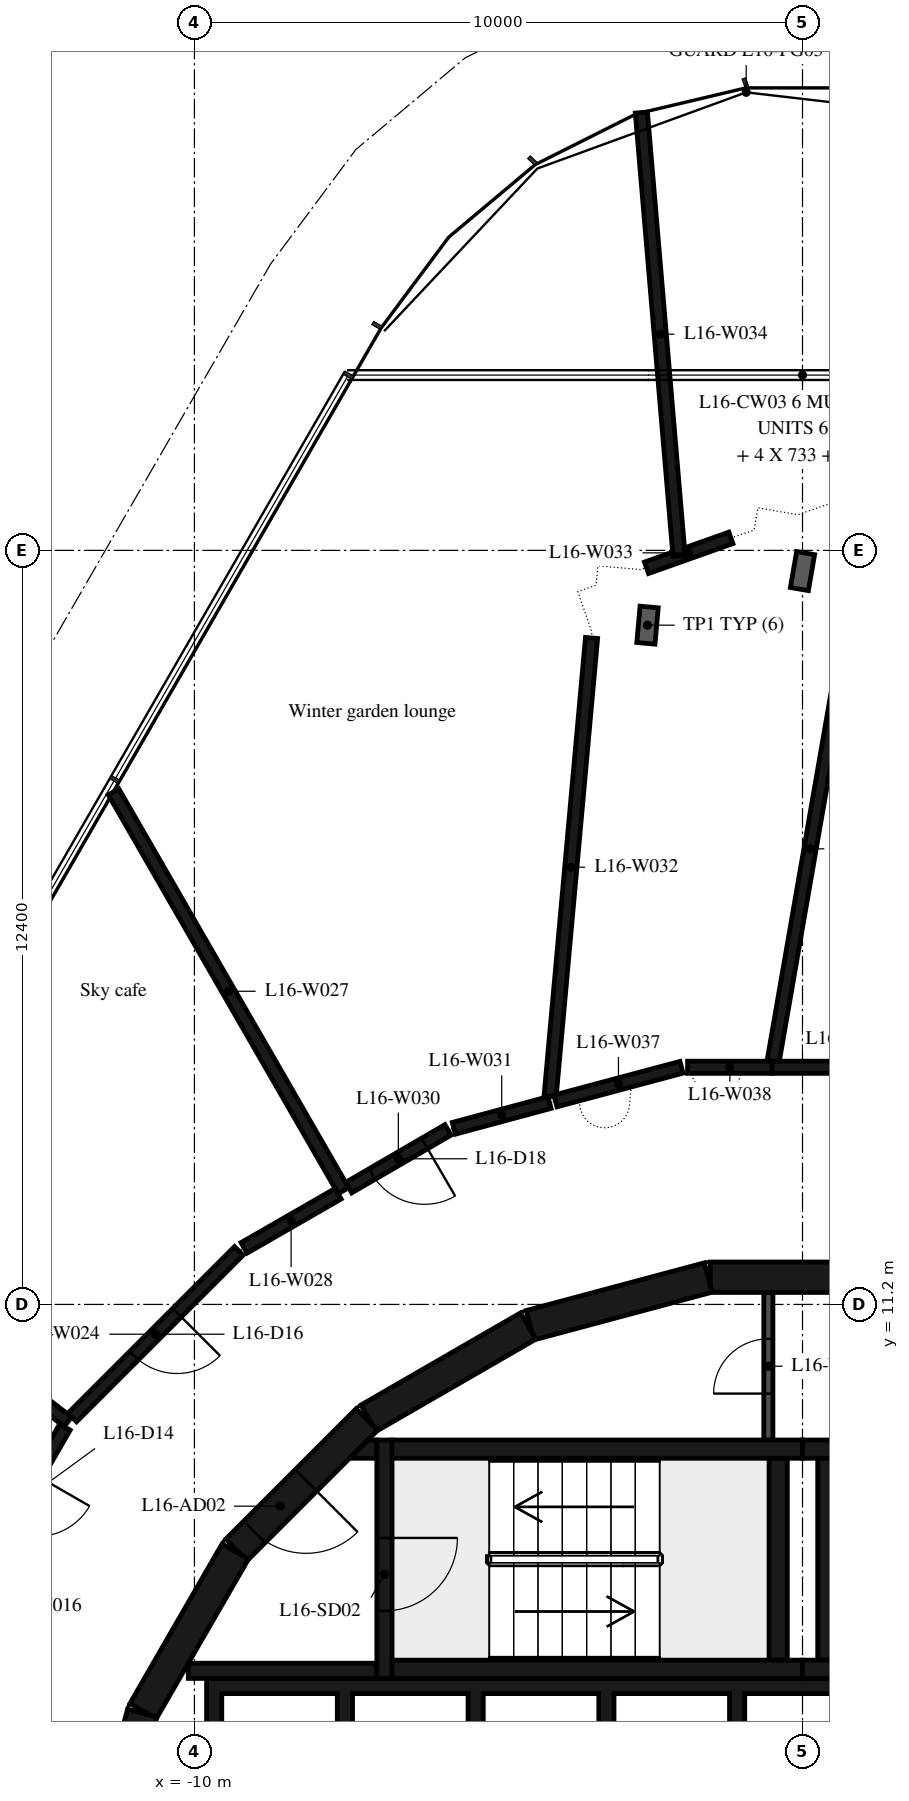
"""IFC4 building model, lengths in metres.
Left out: names, types, materials, properties, quantities, classifications, styles, units other than length and angle.
Written with IfcOpenShell. Run it as: python <this file> out.ifc"""

import sys

from ifc_helpers import new_model, si_unit, direction, frame, frame_2d, origin, place, context, subcontext, project, spatial, polyline, rectangle, outline, extrude, element, fill, save


model = new_model("IFC4")
c1 = context("Model", 3, precision=1e-05, world=origin(), true_north=direction((0.0, 1.0)))
c2 = subcontext(c1, "Body", "Model", "MODEL_VIEW")
j1 = project(units=[si_unit("LENGTHUNIT", "METRE"), si_unit("PLANEANGLEUNIT", "RADIAN")], contexts=[c1])
p1 = place(None, origin())
s1 = spatial("IfcSite", under=j1, at=p1, CompositionType="ELEMENT")
p2 = place(p1, origin())
s2 = spatial("IfcBuilding", under=s1, at=p2, CompositionType="ELEMENT")
p3 = place(p2, frame((0.0, 0.0, 69.9)))
s3 = spatial("IfcBuildingStorey", under=s2, at=p3, CompositionType="ELEMENT", Elevation=69.9)
for number, where, z_axis, x_axis in (
    (1, (1.516, 11.647, 0.0), (0.0, 0.0, 1.0), (-1.0, 0.0, 0.0)),
    (2, (-1.55, 11.643, 0.0), (0.0, 0.0, 1.0), (-0.966, -0.259, 0.0)),
    (3, (-4.51, 10.845, 0.0), (0.0, 0.0, 1.0), (-0.866, -0.5, 0.0)),
):
    element("IfcWall", number, at=place(p3, frame(where, z_axis=z_axis, x_axis=x_axis)), inside=s3, PredefinedType="SHEAR", context=c2, shape_type="SweptSolid", body=[
        extrude(rectangle(XDim=3.033, YDim=0.5, at=frame_2d((1.516, 0.0))), origin(), (0.0, 0.0, 1.0), 6.35),
    ])
p4 = place(p3, frame((-7.164, 9.308, 0.0), z_axis=(0.0, 0.0, 1.0), x_axis=(-0.707106781187, -0.707106781187, 0.0)))
e4 = element("IfcWall", 4, at=p4, inside=s3, PredefinedType="SHEAR", context=c2, shape_type="SweptSolid", body=[
    extrude(rectangle(XDim=3.032, YDim=0.5, at=frame_2d((1.516, 0.0))), origin(), (0.0, 0.0, 1.0), 6.35),
])
p5 = place(p4, frame((1.416, 0.0, 0.0)))
e5 = element("IfcOpeningElement", 5, at=p5, cuts=e4, PredefinedType="OPENING", context=c2, shape_type="SweptSolid", body=[
    extrude(rectangle(XDim=1.2, YDim=2.1, at=frame_2d((0.6, 1.05))), frame((0.0, 0.26, 0.0), z_axis=(0.0, -1.0, 0.0), x_axis=(1.0, 0.0, 0.0)), (0.0, 0.0, 1.0), 0.52),
])
for number, where, z_axis, x_axis in (
    (6, (-9.329, 7.137, 0.0), (0.0, 0.0, 1.0), (-0.5, -0.866, 0.0)),
    (7, (-10.858, 4.479, 0.0), (0.0, 0.0, 1.0), (-0.259, -0.966, 0.0)),
):
    element("IfcWall", number, at=place(p3, frame(where, z_axis=z_axis, x_axis=x_axis)), inside=s3, PredefinedType="SHEAR", context=c2, shape_type="SweptSolid", body=[
        extrude(rectangle(XDim=3.033, YDim=0.5, at=frame_2d((1.516, 0.0))), origin(), (0.0, 0.0, 1.0), 6.35),
    ])
for number, where, z_axis, x_axis in (
    (8, (0.0, 5.2, 0.0), (0.0, 0.0, 1.0), (1.0, 0.0, 0.0)),
    (9, (0.0, 8.82, 0.0), (0.0, 0.0, 1.0), (1.0, 0.0, 0.0)),
):
    element("IfcWall", number, at=place(p3, frame(where, z_axis=z_axis, x_axis=x_axis)), inside=s3, PredefinedType="SHEAR", context=c2, shape_type="SweptSolid", body=[
        extrude(rectangle(XDim=6.75, YDim=0.3, at=frame_2d((3.375, 0.0))), origin(), (0.0, 0.0, 1.0), 6.35),
    ])
p6 = place(p3, frame((0.4, 5.35, 0.0), z_axis=(0.0, 0.0, 1.0), x_axis=(0.0, 1.0, 0.0)))
e10 = element("IfcWall", 10, at=p6, inside=s3, PredefinedType="SHEAR", context=c2, shape_type="SweptSolid", body=[
    extrude(rectangle(XDim=3.32, YDim=0.3, at=frame_2d((1.66, 0.0))), origin(), (0.0, 0.0, 1.0), 6.35),
])
for number, where, z_axis, x_axis in (
    (11, (-6.75, 5.2, 0.0), (0.0, 0.0, 1.0), (1.0, 0.0, 0.0)),
    (12, (-6.75, 8.82, 0.0), (0.0, 0.0, 1.0), (1.0, 0.0, 0.0)),
):
    element("IfcWall", number, at=place(p3, frame(where, z_axis=z_axis, x_axis=x_axis)), inside=s3, PredefinedType="SHEAR", context=c2, shape_type="SweptSolid", body=[
        extrude(rectangle(XDim=6.75, YDim=0.3, at=frame_2d((3.375, 0.0))), origin(), (0.0, 0.0, 1.0), 6.35),
    ])
p7 = place(p3, frame((-0.4, 5.35, 0.0), z_axis=(0.0, 0.0, 1.0), x_axis=(0.0, 1.0, 0.0)))
e13 = element("IfcWall", 13, at=p7, inside=s3, PredefinedType="SHEAR", context=c2, shape_type="SweptSolid", body=[
    extrude(rectangle(XDim=3.32, YDim=0.3, at=frame_2d((1.66, 0.0))), origin(), (0.0, 0.0, 1.0), 6.35),
])
p8 = place(p3, frame((-6.875, 8.97, 0.0), z_axis=(0.0, 0.0, 1.0), x_axis=(0.0, -1.0, 0.0)))
e14 = element("IfcWall", 14, at=p8, inside=s3, PredefinedType="SHEAR", context=c2, shape_type="SweptSolid", body=[
    extrude(rectangle(XDim=3.92, YDim=0.25, at=frame_2d((1.96, 0.0))), origin(), (0.0, 0.0, 1.0), 6.35),
])
p9 = place(p8, frame((1.61, 0.0, 0.0)))
e15 = element("IfcOpeningElement", 15, at=p9, cuts=e14, PredefinedType="OPENING", context=c2, shape_type="SweptSolid", body=[
    extrude(rectangle(XDim=1.2, YDim=2.1, at=frame_2d((0.6, 1.05))), frame((0.0, 0.135, 0.0), z_axis=(0.0, -1.0, 0.0), x_axis=(1.0, 0.0, 0.0)), (0.0, 0.0, 1.0), 0.27),
])
p10 = place(p3, frame((-7.0, 5.175, 0.0), z_axis=(0.0, 0.0, 1.0), x_axis=(-1.0, 0.0, 0.0)))
e16 = element("IfcWall", 16, at=p10, inside=s3, PredefinedType="SHEAR", context=c2, shape_type="SweptSolid", body=[
    extrude(rectangle(XDim=3.1, YDim=0.25, at=frame_2d((1.55, 0.0))), origin(), (0.0, 0.0, 1.0), 6.35),
])
p11 = place(p3, origin())
e17 = element("IfcWall", 17, at=p11, inside=s3, PredefinedType="SHEAR", context=c2, shape_type="SweptSolid", body=[
    extrude(outline(polyline([(-7.148, 8.97), (-7.0, 8.97), (-7.0, 8.67), (-7.448, 8.67), (-7.148, 8.97)])), origin(), (0.0, 0.0, 1.0), 6.35),
])
p12 = place(p3, origin())
e18 = element("IfcWall", 18, at=p12, inside=s3, PredefinedType="SHEAR", context=c2, shape_type="SweptSolid", body=[
    extrude(outline(polyline([(-9.55, 4.8), (-7.65, 4.8), (-7.65, 1.9), (-7.4, 1.9), (-7.4, 4.8), (-5.5, 4.8), (-5.5, 1.9), (-5.25, 1.9), (-5.25, 4.8), (-3.35, 4.8), (-3.35, 1.9), (-3.1, 1.9), (-3.1, 4.8), (-1.2, 4.8), (-1.2, 1.9), (-0.95, 1.9), (-0.95, 4.8), (0.95, 4.8), (0.95, 1.9), (1.2, 1.9), (1.2, 4.8), (3.1, 4.8), (3.1, 1.9), (3.35, 1.9), (3.35, 4.8), (5.25, 4.8), (5.25, 1.9), (5.5, 1.9), (5.5, 4.8), (7.4, 4.8), (7.4, 1.9), (7.65, 1.9), (7.65, 4.8), (9.55, 4.8), (9.55, 1.9), (9.8, 1.9), (9.8, 4.8), (9.8, 5.05), (-9.8, 5.05), (-9.8, 4.8), (-9.8, 1.9), (-9.55, 1.9), (-9.55, 4.8)])), origin(), (0.0, 0.0, 1.0), 6.35),
])
p13 = place(p3, frame((-0.562, 8.97, 0.0), z_axis=(0.0, 0.0, 1.0), x_axis=(0.0, 1.0, 0.0)))
e19 = element("IfcWall", 19, at=p13, inside=s3, PredefinedType="PARTITIONING", context=c2, shape_type="SweptSolid", body=[
    extrude(rectangle(XDim=2.427, YDim=0.15, at=frame_2d((1.214, 0.0))), origin(), (0.0, 0.0, 1.0), 6.35),
])
p14 = place(p13, frame((0.764, 0.0, 0.0)))
e20 = element("IfcOpeningElement", 20, at=p14, cuts=e19, PredefinedType="OPENING", context=c2, shape_type="SweptSolid", body=[
    extrude(rectangle(XDim=0.9, YDim=2.1, at=frame_2d((0.45, 1.05))), frame((0.0, 0.085, 0.0), z_axis=(0.0, -1.0, 0.0), x_axis=(1.0, 0.0, 0.0)), (0.0, 0.0, 1.0), 0.17),
])
p15 = place(p3, frame((-12.08, 9.27, 0.0), z_axis=(0.0, 0.0, 1.0), x_axis=(-0.793910503162, 0.60803463139, 0.0)))
e21 = element("IfcWall", 21, at=p15, inside=s3, PredefinedType="PARTITIONING", context=c2, shape_type="SweptSolid", body=[
    extrude(rectangle(XDim=4.572, YDim=0.2, at=frame_2d((2.286, 0.0))), origin(), (0.0, 0.0, 1.0), 6.35),
])
p16 = place(p3, frame((-12.13, 9.183, 0.0), z_axis=(0.0, 0.0, 1.0), x_axis=(-0.498935163829, -0.866639314995, 0.0)))
e22 = element("IfcWall", 22, at=p16, inside=s3, PredefinedType="PARTITIONING", context=c2, shape_type="SweptSolid", body=[
    extrude(rectangle(XDim=2.846, YDim=0.2, at=frame_2d((1.423, 0.0))), origin(), (0.0, 0.0, 1.0), 6.35),
])
p17 = place(p16, frame((0.923, 0.0, 0.0)))
e23 = element("IfcOpeningElement", 23, at=p17, cuts=e22, PredefinedType="OPENING", context=c2, shape_type="SweptSolid", body=[
    extrude(rectangle(XDim=1.0, YDim=2.1, at=frame_2d((0.5, 1.05))), frame((0.0, 0.11, 0.0), z_axis=(0.0, -1.0, 0.0), x_axis=(1.0, 0.0, 0.0)), (0.0, 0.0, 1.0), 0.22),
])
p18 = place(p3, frame((-9.27, 12.08, 0.0), z_axis=(0.0, 0.0, 1.0), x_axis=(-0.707106781187, -0.707106781187, 0.0)))
e24 = element("IfcWall", 24, at=p18, inside=s3, PredefinedType="PARTITIONING", context=c2, shape_type="SweptSolid", body=[
    extrude(rectangle(XDim=3.874, YDim=0.2, at=frame_2d((1.937, 0.0))), origin(), (0.0, 0.0, 1.0), 6.35),
])
p19 = place(p18, frame((1.437, 0.0, 0.0)))
e25 = element("IfcOpeningElement", 25, at=p19, cuts=e24, PredefinedType="OPENING", context=c2, shape_type="SweptSolid", body=[
    extrude(rectangle(XDim=1.0, YDim=2.1, at=frame_2d((0.5, 1.05))), frame((0.0, 0.11, 0.0), z_axis=(0.0, -1.0, 0.0), x_axis=(1.0, 0.0, 0.0)), (0.0, 0.0, 1.0), 0.22),
])
p20 = place(p3, frame((-7.55, 13.07, 0.0), z_axis=(0.0, 0.0, 1.0), x_axis=(-0.499278518991, 0.866441550524, 0.0)))
e26 = element("IfcWall", 26, at=p20, inside=s3, PredefinedType="PARTITIONING", context=c2, shape_type="SweptSolid", body=[
    extrude(rectangle(XDim=7.571, YDim=0.2, at=frame_2d((3.786, 0.0))), origin(), (0.0, 0.0, 1.0), 6.35),
])
p21 = place(p3, frame((-7.637, 13.02, 0.0), z_axis=(0.0, 0.0, 1.0), x_axis=(-0.8667067021, -0.498818095637, 0.0)))
e27 = element("IfcWall", 27, at=p21, inside=s3, PredefinedType="PARTITIONING", context=c2, shape_type="SweptSolid", body=[
    extrude(rectangle(XDim=1.784, YDim=0.2, at=frame_2d((0.892, 0.0))), origin(), (0.0, 0.0, 1.0), 6.35),
])
p22 = place(p3, frame((-5.83, 14.07, 0.0), z_axis=(0.0, 0.0, 1.0), x_axis=(-0.864513714777, -0.502609228887, 0.0)))
e28 = element("IfcWall", 28, at=p22, inside=s3, PredefinedType="PARTITIONING", context=c2, shape_type="SweptSolid", body=[
    extrude(rectangle(XDim=1.89, YDim=0.2, at=frame_2d((0.945, 0.0))), origin(), (0.0, 0.0, 1.0), 6.35),
])
p23 = place(p22, frame((0.445, 0.0, 0.0)))
e29 = element("IfcOpeningElement", 29, at=p23, cuts=e28, PredefinedType="OPENING", context=c2, shape_type="SweptSolid", body=[
    extrude(rectangle(XDim=1.0, YDim=2.1, at=frame_2d((0.5, 1.05))), frame((0.0, 0.11, 0.0), z_axis=(0.0, -1.0, 0.0), x_axis=(1.0, 0.0, 0.0)), (0.0, 0.0, 1.0), 0.22),
])
p24 = place(p3, frame((-4.16, 14.52, 0.0), z_axis=(0.0, 0.0, 1.0), x_axis=(-0.96554774119, -0.260225977726, 0.0)))
e30 = element("IfcWall", 30, at=p24, inside=s3, PredefinedType="PARTITIONING", context=c2, shape_type="SweptSolid", body=[
    extrude(rectangle(XDim=1.63, YDim=0.2, at=frame_2d((0.815, 0.0))), origin(), (0.0, 0.0, 1.0), 6.35),
])
p25 = place(p3, frame((-3.469, 22.16, 0.0), z_axis=(0.0, 0.0, 1.0), x_axis=(-0.090058939674, -0.995936437422, 0.0)))
e31 = element("IfcWall", 31, at=p25, inside=s3, PredefinedType="PARTITIONING", context=c2, shape_type="SweptSolid", body=[
    extrude(rectangle(XDim=7.572, YDim=0.2, at=frame_2d((3.786, 0.0))), origin(), (0.0, 0.0, 1.0), 6.35),
])
p26 = place(p3, frame((-2.566, 23.313, 0.0), z_axis=(0.0, 0.0, 1.0), x_axis=(0.942422688544, 0.334424096199, 0.0)))
e32 = element("IfcWall", 32, at=p26, inside=s3, PredefinedType="PARTITIONING", context=c2, shape_type="SweptSolid", body=[
    extrude(rectangle(XDim=1.472, YDim=0.2, at=frame_2d((0.736, 0.0))), origin(), (0.0, 0.0, 1.0), 6.35),
])
p27 = place(p3, frame((-2.03, 23.51, 0.0), z_axis=(0.0, 0.0, 1.0), x_axis=(-0.084724408258, 0.996404423236, 0.0)))
e33 = element("IfcWall", 33, at=p27, inside=s3, PredefinedType="PARTITIONING", context=c2, shape_type="SweptSolid", body=[
    extrude(rectangle(XDim=7.316, YDim=0.2, at=frame_2d((3.658, 0.0))), origin(), (0.0, 0.0, 1.0), 6.35),
])
p28 = place(p3, frame((-1.99, 15.1, 0.0), z_axis=(0.0, 0.0, 1.0), x_axis=(-0.966087519043, -0.258214843781, 0.0)))
e34 = element("IfcWall", 34, at=p28, inside=s3, PredefinedType="PARTITIONING", context=c2, shape_type="SweptSolid", body=[
    extrude(rectangle(XDim=2.146, YDim=0.2, at=frame_2d((1.073, 0.0))), origin(), (0.0, 0.0, 1.0), 6.35),
])
p29 = place(p3, frame((-0.5, 15.1, 0.0), z_axis=(0.0, 0.0, 1.0), x_axis=(-1.0, 0.0, 0.0)))
e35 = element("IfcWall", 35, at=p29, inside=s3, PredefinedType="PARTITIONING", context=c2, shape_type="SweptSolid", body=[
    extrude(rectangle(XDim=1.39, YDim=0.2, at=frame_2d((0.695, 0.0))), origin(), (0.0, 0.0, 1.0), 6.35),
])
p30 = place(p3, frame((-0.483, 15.198, 0.0), z_axis=(0.0, 0.0, 1.0), x_axis=(0.171227856746, 0.985231455585, 0.0)))
e36 = element("IfcWall", 36, at=p30, inside=s3, PredefinedType="PARTITIONING", context=c2, shape_type="SweptSolid", body=[
    extrude(rectangle(XDim=7.092, YDim=0.2, at=frame_2d((3.546, 0.0))), origin(), (0.0, 0.0, 1.0), 6.35),
])
p31 = place(p3, frame((1.99, 15.1, 0.0), z_axis=(0.0, 0.0, 1.0), x_axis=(-1.0, 0.0, 0.0)))
e37 = element("IfcWall", 37, at=p31, inside=s3, PredefinedType="PARTITIONING", context=c2, shape_type="SweptSolid", body=[
    extrude(rectangle(XDim=2.49, YDim=0.2, at=frame_2d((1.245, 0.0))), origin(), (0.0, 0.0, 1.0), 6.35),
])
p32 = place(p9, origin())
e38 = element("IfcDoor", 38, at=p32, inside=s3, OperationType="SINGLE_SWING_LEFT", PredefinedType="DOOR", context=c2, shape_type="SweptSolid", body=[
    extrude(rectangle(XDim=1.2, YDim=2.1, at=frame_2d((0.6, 1.05))), frame((0.0, 0.025, 0.0), z_axis=(0.0, -1.0, 0.0), x_axis=(1.0, 0.0, 0.0)), (0.0, 0.0, 1.0), 0.05),
])
fill(e15, e38)
p33 = place(p5, origin())
e39 = element("IfcDoor", 39, at=p33, inside=s3, OperationType="SINGLE_SWING_RIGHT", PredefinedType="DOOR", context=c2, shape_type="SweptSolid", body=[
    extrude(rectangle(XDim=1.2, YDim=2.1, at=frame_2d((0.6, 1.05))), frame((0.0, 0.025, 0.0), z_axis=(0.0, -1.0, 0.0), x_axis=(1.0, 0.0, 0.0)), (0.0, 0.0, 1.0), 0.05),
])
fill(e5, e39)
p34 = place(p14, origin())
e40 = element("IfcDoor", 40, at=p34, inside=s3, OperationType="SINGLE_SWING_RIGHT", PredefinedType="DOOR", context=c2, shape_type="SweptSolid", body=[
    extrude(rectangle(XDim=0.9, YDim=2.1, at=frame_2d((0.45, 1.05))), frame((0.0, 0.025, 0.0), z_axis=(0.0, -1.0, 0.0), x_axis=(1.0, 0.0, 0.0)), (0.0, 0.0, 1.0), 0.05),
])
fill(e20, e40)
p35 = place(p19, origin())
e41 = element("IfcDoor", 41, at=p35, inside=s3, OperationType="SINGLE_SWING_LEFT", PredefinedType="DOOR", context=c2, shape_type="SweptSolid", body=[
    extrude(rectangle(XDim=1.0, YDim=2.1, at=frame_2d((0.5, 1.05))), frame((0.0, 0.025, 0.0), z_axis=(0.0, -1.0, 0.0), x_axis=(1.0, 0.0, 0.0)), (0.0, 0.0, 1.0), 0.05),
])
fill(e25, e41)
p36 = place(p23, origin())
e42 = element("IfcDoor", 42, at=p36, inside=s3, OperationType="SINGLE_SWING_LEFT", PredefinedType="DOOR", context=c2, shape_type="SweptSolid", body=[
    extrude(rectangle(XDim=1.0, YDim=2.1, at=frame_2d((0.5, 1.05))), frame((0.0, 0.025, 0.0), z_axis=(0.0, -1.0, 0.0), x_axis=(1.0, 0.0, 0.0)), (0.0, 0.0, 1.0), 0.05),
])
fill(e29, e42)
save(model, sys.argv[1])
